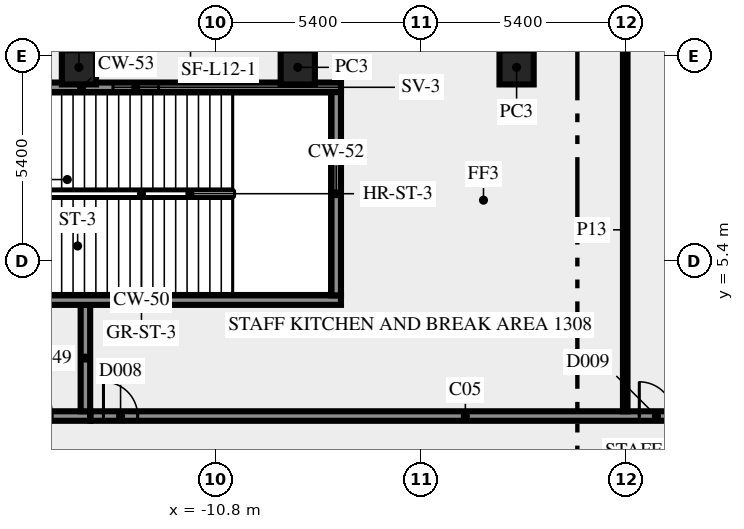
"""IFC4 building model, lengths in metres.
Left out: names, types, materials, properties, quantities, classifications, styles, units other than length and angle.
Written with IfcOpenShell. Run it as: python <this file> out.ifc"""

import sys

from ifc_helpers import new_model, si_unit, direction, frame, frame_2d, origin, origin_2d, place, context, subcontext, project, spatial, rectangle, extrude, element, fill, save


model = new_model("IFC4")
c1 = context("Model", 3, precision=1e-05, world=origin(), true_north=direction((0.0, 1.0)))
c2 = subcontext(c1, "Body", "Model", "MODEL_VIEW")
j1 = project(units=[si_unit("LENGTHUNIT", "METRE"), si_unit("PLANEANGLEUNIT", "RADIAN")], contexts=[c1])
p1 = place(None, origin())
s1 = spatial("IfcSite", under=j1, at=p1, CompositionType="ELEMENT")
p2 = place(p1, origin())
s2 = spatial("IfcBuilding", under=s1, at=p2, CompositionType="ELEMENT")
p3 = place(p2, frame((0.0, 0.0, 59.0)))
s3 = spatial("IfcBuildingStorey", under=s2, at=p3, CompositionType="ELEMENT", Elevation=59.0)
for number, where, z_axis, x_axis in (
    (1, (-2.879, 10.5, 0.0), (0.0, 0.0, 1.0), (-1.0, 0.0, 0.0)),
    (2, (-8.637, 10.5, 0.0), (0.0, 0.0, 1.0), (-1.0, 0.0, 0.0)),
    (3, (-14.395, 10.5, 0.0), (0.0, 0.0, 1.0), (-1.0, 0.0, 0.0)),
):
    element("IfcColumn", number, at=place(p3, frame(where, z_axis=z_axis, x_axis=x_axis)), inside=s3, PredefinedType="COLUMN", context=c2, shape_type="SweptSolid", body=[
        extrude(rectangle(XDim=0.9, YDim=0.9, at=origin_2d()), origin(), (0.0, 0.0, 1.0), 3.65),
    ])
p4 = place(p3, frame((-18.0, 1.325, 0.0), z_axis=(0.0, 0.0, 1.0), x_axis=(1.0, 0.0, 0.0)))
e4 = element("IfcWall", 4, at=p4, inside=s3, PredefinedType="SHEAR", context=c2, shape_type="SweptSolid", body=[
    extrude(rectangle(XDim=3.9, YDim=0.25, at=frame_2d((1.95, 0.0))), origin(), (0.0, 0.0, 1.0), 3.65),
])
p5 = place(p4, frame((1.1, 0.0, 0.0)))
e5 = element("IfcOpeningElement", 5, at=p5, cuts=e4, PredefinedType="OPENING", context=c2, shape_type="SweptSolid", body=[
    extrude(rectangle(XDim=1.8, YDim=2.1, at=frame_2d((0.9, 1.05))), frame((0.0, 0.135, 0.0), z_axis=(0.0, -1.0, 0.0), x_axis=(1.0, 0.0, 0.0)), (0.0, 0.0, 1.0), 0.27),
])
p6 = place(p3, frame((-14.225, 1.45, 0.0), z_axis=(0.0, 0.0, 1.0), x_axis=(0.0, 1.0, 0.0)))
e6 = element("IfcWall", 6, at=p6, inside=s3, PredefinedType="SHEAR", context=c2, shape_type="SweptSolid", body=[
    extrude(rectangle(XDim=2.8, YDim=0.25, at=frame_2d((1.4, 0.0))), origin(), (0.0, 0.0, 1.0), 3.65),
])
p7 = place(p3, frame((-18.0, 4.375, 0.0), z_axis=(0.0, 0.0, 1.0), x_axis=(1.0, 0.0, 0.0)))
e7 = element("IfcWall", 7, at=p7, inside=s3, PredefinedType="SHEAR", context=c2, shape_type="SweptSolid", body=[
    extrude(rectangle(XDim=10.5, YDim=0.25, at=frame_2d((5.25, 0.0))), origin(), (0.0, 0.0, 1.0), 3.65),
])
p8 = place(p7, frame((0.3, 0.0, 0.0)))
e8 = element("IfcOpeningElement", 8, at=p8, cuts=e7, PredefinedType="OPENING", context=c2, shape_type="SweptSolid", body=[
    extrude(rectangle(XDim=1.8, YDim=2.1, at=frame_2d((0.9, 1.05))), frame((0.0, 0.135, 0.0), z_axis=(0.0, -1.0, 0.0), x_axis=(1.0, 0.0, 0.0)), (0.0, 0.0, 1.0), 0.27),
])
p9 = place(p3, frame((-7.625, 4.5, 0.0), z_axis=(0.0, 0.0, 1.0), x_axis=(0.0, 1.0, 0.0)))
e9 = element("IfcWall", 9, at=p9, inside=s3, PredefinedType="SHEAR", context=c2, shape_type="SweptSolid", body=[
    extrude(rectangle(XDim=5.35, YDim=0.25, at=frame_2d((2.675, 0.0))), origin(), (0.0, 0.0, 1.0), 3.65),
])
p10 = place(p3, frame((-18.0, 9.975, 0.0), z_axis=(0.0, 0.0, 1.0), x_axis=(1.0, 0.0, 0.0)))
e10 = element("IfcWall", 10, at=p10, inside=s3, PredefinedType="SHEAR", context=c2, shape_type="SweptSolid", body=[
    extrude(rectangle(XDim=10.5, YDim=0.25, at=frame_2d((5.25, 0.0))), origin(), (0.0, 0.0, 1.0), 3.65),
])
p11 = place(p10, frame((4.5, 0.0, 1.0)))
e11 = element("IfcOpeningElement", 11, at=p11, cuts=e10, PredefinedType="OPENING", context=c2, shape_type="SweptSolid", body=[
    extrude(rectangle(XDim=1.2, YDim=1.2, at=frame_2d((0.6, 0.6))), frame((0.0, 0.135, 0.0), z_axis=(0.0, -1.0, 0.0), x_axis=(1.0, 0.0, 0.0)), (0.0, 0.0, 1.0), 0.27),
])
p12 = place(p3, frame((-14.09, 1.325, 0.0), z_axis=(0.0, 0.0, 1.0), x_axis=(1.0, 0.0, 0.0)))
e12 = element("IfcWall", 12, at=p12, inside=s3, PredefinedType="SOLIDWALL", context=c2, shape_type="SweptSolid", body=[
    extrude(rectangle(XDim=28.18, YDim=0.25, at=frame_2d((14.09, 0.0))), origin(), (0.0, 0.0, 1.0), 3.65),
])
p13 = place(p12, frame((26.94, 0.0, 0.0)))
e13 = element("IfcOpeningElement", 13, at=p13, cuts=e12, PredefinedType="OPENING", context=c2, shape_type="SweptSolid", body=[
    extrude(rectangle(XDim=0.9, YDim=2.1, at=frame_2d((0.45, 1.05))), frame((0.0, 0.135, 0.0), z_axis=(0.0, -1.0, 0.0), x_axis=(1.0, 0.0, 0.0)), (0.0, 0.0, 1.0), 0.27),
])
p14 = place(p12, frame((0.34, 0.0, 0.0)))
e14 = element("IfcOpeningElement", 14, at=p14, cuts=e12, PredefinedType="OPENING", context=c2, shape_type="SweptSolid", body=[
    extrude(rectangle(XDim=0.9, YDim=2.1, at=frame_2d((0.45, 1.05))), frame((0.0, 0.135, 0.0), z_axis=(0.0, -1.0, 0.0), x_axis=(1.0, 0.0, 0.0)), (0.0, 0.0, 1.0), 0.27),
])
p15 = place(p12, frame((14.44, 0.0, 0.0)))
e15 = element("IfcOpeningElement", 15, at=p15, cuts=e12, PredefinedType="OPENING", context=c2, shape_type="SweptSolid", body=[
    extrude(rectangle(XDim=0.9, YDim=2.1, at=frame_2d((0.45, 1.05))), frame((0.0, 0.135, 0.0), z_axis=(0.0, -1.0, 0.0), x_axis=(1.0, 0.0, 0.0)), (0.0, 0.0, 1.0), 0.27),
])
p16 = place(p3, frame((-0.02, 1.45, 0.0), z_axis=(0.0, 0.0, 1.0), x_axis=(0.0, 1.0, 0.0)))
e16 = element("IfcWall", 16, at=p16, inside=s3, PredefinedType="PARTITIONING", context=c2, shape_type="SweptSolid", body=[
    extrude(rectangle(XDim=9.55, YDim=0.12, at=frame_2d((4.775, 0.0))), origin(), (0.0, 0.0, 1.0), 2.75),
])
p17 = place(p5, origin())
e17 = element("IfcDoor", 17, at=p17, inside=s3, OperationType="DOUBLE_DOOR_SINGLE_SWING", PredefinedType="DOOR", context=c2, shape_type="SweptSolid", body=[
    extrude(rectangle(XDim=1.8, YDim=2.1, at=frame_2d((0.9, 1.05))), frame((0.0, 0.025, 0.0), z_axis=(0.0, -1.0, 0.0), x_axis=(1.0, 0.0, 0.0)), (0.0, 0.0, 1.0), 0.05),
])
fill(e5, e17)
p18 = place(p11, origin())
e18 = element("IfcWindow", 18, at=p18, inside=s3, PartitioningType="SINGLE_PANEL", PredefinedType="WINDOW", context=c2, shape_type="SweptSolid", body=[
    extrude(rectangle(XDim=1.2, YDim=1.2, at=frame_2d((0.6, 0.6))), frame((0.0, 0.03, 0.0), z_axis=(0.0, -1.0, 0.0), x_axis=(1.0, 0.0, 0.0)), (0.0, 0.0, 1.0), 0.06),
])
fill(e11, e18)
p19 = place(p14, origin())
e19 = element("IfcDoor", 19, at=p19, inside=s3, OperationType="SINGLE_SWING_LEFT", PredefinedType="DOOR", context=c2, shape_type="SweptSolid", body=[
    extrude(rectangle(XDim=0.9, YDim=2.1, at=frame_2d((0.45, 1.05))), frame((0.0, 0.025, 0.0), z_axis=(0.0, -1.0, 0.0), x_axis=(1.0, 0.0, 0.0)), (0.0, 0.0, 1.0), 0.05),
])
fill(e14, e19)
p20 = place(p15, origin())
e20 = element("IfcDoor", 20, at=p20, inside=s3, OperationType="SINGLE_SWING_LEFT", PredefinedType="DOOR", context=c2, shape_type="SweptSolid", body=[
    extrude(rectangle(XDim=0.9, YDim=2.1, at=frame_2d((0.45, 1.05))), frame((0.0, 0.025, 0.0), z_axis=(0.0, -1.0, 0.0), x_axis=(1.0, 0.0, 0.0)), (0.0, 0.0, 1.0), 0.05),
])
fill(e15, e20)
save(model, sys.argv[1])
